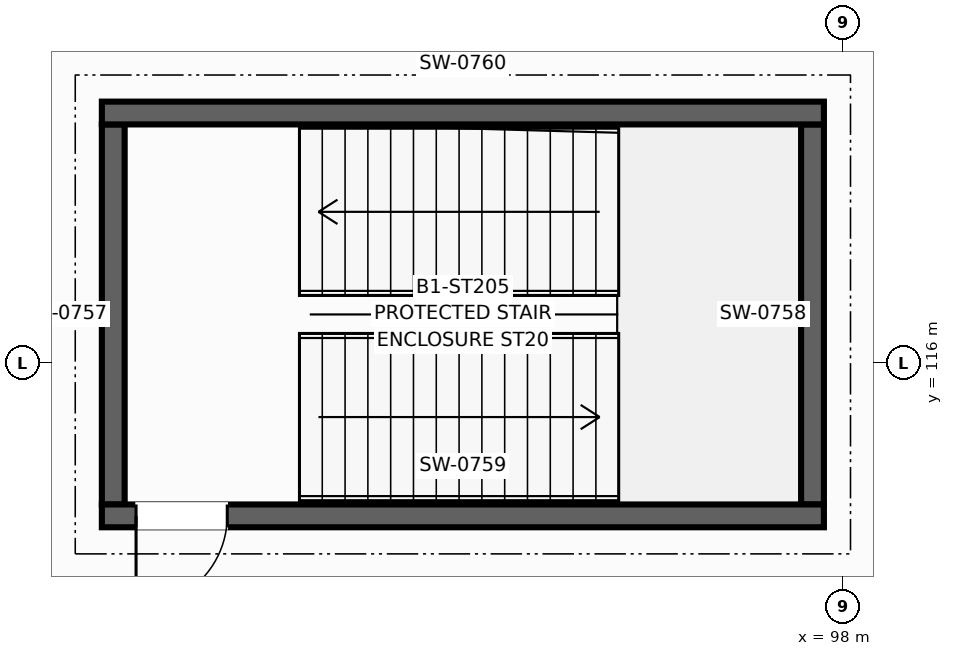
"""IFC4 building model, lengths in metres.
Left out: names, types, materials, properties, quantities, classifications, styles, units other than length and angle.
Written with IfcOpenShell. Run it as: python <this file> out.ifc"""

import sys

from ifc_helpers import new_model, si_unit, direction, frame, frame_2d, origin, place, context, subcontext, project, spatial, rectangle, extrude, element, fill, save


model = new_model("IFC4")
c1 = context("Model", 3, precision=1e-05, world=origin(), true_north=direction((0.0, 1.0)))
c2 = subcontext(c1, "Body", "Model", "MODEL_VIEW")
j1 = project(units=[si_unit("LENGTHUNIT", "METRE"), si_unit("PLANEANGLEUNIT", "RADIAN")], contexts=[c1])
p1 = place(None, origin())
s1 = spatial("IfcSite", under=j1, at=p1, CompositionType="ELEMENT")
p2 = place(p1, origin())
s2 = spatial("IfcBuilding", under=s1, at=p2, CompositionType="ELEMENT")
p3 = place(p2, frame((0.0, 0.0, -4.5)))
s3 = spatial("IfcBuildingStorey", under=s2, at=p3, CompositionType="ELEMENT", Elevation=-4.5)
for number, where, z_axis, x_axis in (
    (1, (88.4, 114.14, 0.0), (0.0, 0.0, 1.0), (0.0, 1.0, 0.0)),
    (2, (97.6, 114.14, 0.0), (0.0, 0.0, 1.0), (0.0, 1.0, 0.0)),
):
    element("IfcWall", number, at=place(p3, frame(where, z_axis=z_axis, x_axis=x_axis)), inside=s3, PredefinedType="SHEAR", context=c2, shape_type="SweptSolid", body=[
        extrude(rectangle(XDim=5.0, YDim=0.3, at=frame_2d((2.5, 0.0))), origin(), (0.0, 0.0, 1.0), 4.225),
    ])
p4 = place(p3, frame((88.25, 113.99, 0.0), z_axis=(0.0, 0.0, 1.0), x_axis=(1.0, 0.0, 0.0)))
e3 = element("IfcWall", 3, at=p4, inside=s3, PredefinedType="SHEAR", context=c2, shape_type="SweptSolid", body=[
    extrude(rectangle(XDim=9.5, YDim=0.3, at=frame_2d((4.75, 0.0))), origin(), (0.0, 0.0, 1.0), 4.225),
])
p5 = place(p4, frame((0.45, 0.0, 0.0)))
e4 = element("IfcOpeningElement", 4, at=p5, cuts=e3, PredefinedType="OPENING", context=c2, shape_type="SweptSolid", body=[
    extrude(rectangle(XDim=1.2, YDim=2.2, at=frame_2d((0.6, 1.1))), frame((0.0, 0.16, 0.0), z_axis=(0.0, -1.0, 0.0), x_axis=(1.0, 0.0, 0.0)), (0.0, 0.0, 1.0), 0.32),
])
p6 = place(p3, frame((88.25, 119.29, 0.0), z_axis=(0.0, 0.0, 1.0), x_axis=(1.0, 0.0, 0.0)))
e5 = element("IfcWall", 5, at=p6, inside=s3, PredefinedType="SHEAR", context=c2, shape_type="SweptSolid", body=[
    extrude(rectangle(XDim=9.5, YDim=0.3, at=frame_2d((4.75, 0.0))), origin(), (0.0, 0.0, 1.0), 4.225),
])
p7 = place(p5, frame((1.2, 0.0, 0.0), z_axis=(0.0, 0.0, 1.0), x_axis=(-1.0, 0.0, 0.0)))
e6 = element("IfcDoor", 6, at=p7, inside=s3, OperationType="SINGLE_SWING_LEFT", PredefinedType="DOOR", context=c2, shape_type="SweptSolid", body=[
    extrude(rectangle(XDim=1.2, YDim=2.2, at=frame_2d((0.6, 1.1))), frame((0.0, 0.025, 0.0), z_axis=(0.0, -1.0, 0.0), x_axis=(1.0, 0.0, 0.0)), (0.0, 0.0, 1.0), 0.05),
])
fill(e4, e6)
save(model, sys.argv[1])
